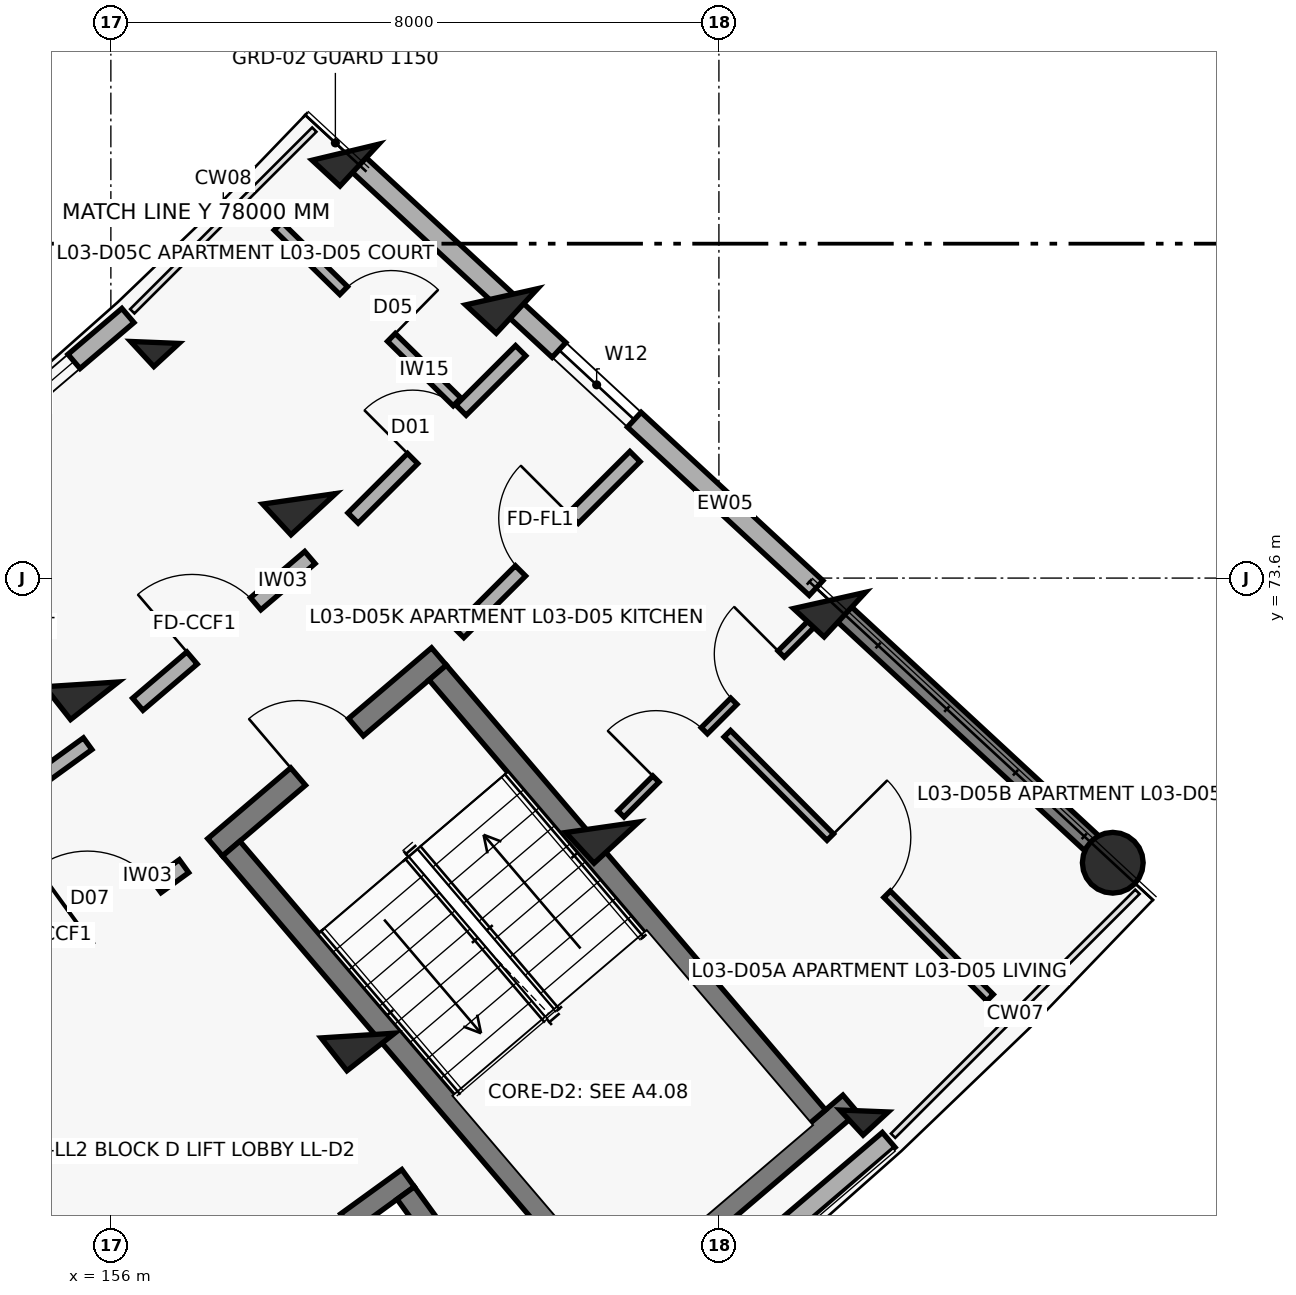
"""IFC4 building model, lengths in metres.
Left out: names, types, materials, properties, quantities, classifications, styles, units other than length and angle.
Written with IfcOpenShell. Run it as: python <this file> out.ifc"""

import sys

from ifc_helpers import new_model, si_unit, direction, frame, frame_2d, origin, origin_2d, place, context, subcontext, project, spatial, rectangle, circle, extrude, element, fill, save


model = new_model("IFC4")
c1 = context("Model", 3, precision=1e-05, world=origin(), true_north=direction((0.0, 1.0)))
c2 = subcontext(c1, "Body", "Model", "MODEL_VIEW")
j1 = project(units=[si_unit("LENGTHUNIT", "METRE"), si_unit("PLANEANGLEUNIT", "RADIAN")], contexts=[c1])
p1 = place(None, origin())
s1 = spatial("IfcSite", under=j1, at=p1, CompositionType="ELEMENT")
p2 = place(p1, origin())
s2 = spatial("IfcBuilding", under=s1, at=p2, CompositionType="ELEMENT")
p3 = place(p2, frame((0.0, 0.0, 11.2)))
s3 = spatial("IfcBuildingStorey", under=s2, at=p3, CompositionType="ELEMENT", Elevation=11.2)
for number, where, z_axis, x_axis in (
    (1, (155.831, 65.101, 0.0), (0.0, 0.0, 1.0), (0.555, -0.832, 0.0)),
    (2, (155.614, 72.202, 0.0), (0.0, 0.0, 1.0), (0.618, -0.786, 0.0)),
    (3, (159.25, 67.581, 0.0), (0.0, 0.0, 1.0), (0.618, -0.786, 0.0)),
):
    element("IfcColumn", number, at=place(p3, frame(where, z_axis=z_axis, x_axis=x_axis)), inside=s3, PredefinedType="COLUMN", context=c2, shape_type="SweptSolid", body=[
        extrude(rectangle(XDim=0.55, YDim=0.8, at=origin_2d()), origin(), (0.0, 0.0, 1.0), 3.1),
    ])
p4 = place(p3, frame((156.579, 76.701, 0.0), z_axis=(0.0, 0.0, 1.0), x_axis=(0.678159669868, -0.73491459515, 0.0)))
e4 = element("IfcColumn", 4, at=p4, inside=s3, PredefinedType="COLUMN", context=c2, shape_type="SweptSolid", body=[
    extrude(rectangle(XDim=0.45, YDim=0.45, at=origin_2d()), origin(), (0.0, 0.0, 1.0), 3.1),
])
for number, where, z_axis, x_axis in (
    (5, (158.477, 74.643, 0.0), (0.0, 0.0, 1.0), (0.678, -0.735, 0.0)),
    (6, (162.465, 70.322, 0.0), (0.0, 0.0, 1.0), (0.678, -0.735, 0.0)),
):
    element("IfcColumn", number, at=place(p3, frame(where, z_axis=z_axis, x_axis=x_axis)), inside=s3, PredefinedType="COLUMN", context=c2, shape_type="SweptSolid", body=[
        extrude(rectangle(XDim=0.55, YDim=0.8, at=origin_2d()), origin(), (0.0, 0.0, 1.0), 3.1),
    ])
p5 = place(p3, frame((165.91, 66.588, 0.0), z_axis=(0.0, 0.0, 1.0), x_axis=(0.678159669868, -0.73491459515, 0.0)))
e7 = element("IfcColumn", 7, at=p5, inside=s3, PredefinedType="COLUMN", context=c2, shape_type="SweptSolid", body=[
    extrude(rectangle(XDim=0.45, YDim=0.45, at=origin_2d()), origin(), (0.0, 0.0, 1.0), 3.1),
])
p6 = place(p3, frame((159.086, 79.204, 0.0), z_axis=(0.0, 0.0, 1.0), x_axis=(0.733729864503, -0.679441304262, 0.0)))
e8 = element("IfcColumn", 8, at=p6, inside=s3, PredefinedType="COLUMN", context=c2, shape_type="SweptSolid", body=[
    extrude(rectangle(XDim=0.5, YDim=0.75, at=origin_2d()), origin(), (0.0, 0.0, 1.0), 3.1),
])
for number, where, z_axis, x_axis in (
    (9, (161.14, 77.301, 0.0), (0.0, 0.0, 1.0), (0.734, -0.679, 0.0)),
    (10, (165.455, 73.306, 0.0), (0.0, 0.0, 1.0), (0.734, -0.679, 0.0)),
):
    element("IfcColumn", number, at=place(p3, frame(where, z_axis=z_axis, x_axis=x_axis)), inside=s3, PredefinedType="COLUMN", context=c2, shape_type="SweptSolid", body=[
        extrude(rectangle(XDim=0.55, YDim=0.8, at=origin_2d()), origin(), (0.0, 0.0, 1.0), 3.1),
    ])
p7 = place(p3, frame((169.182, 69.854, 0.0), z_axis=(0.0, 0.0, 1.0), x_axis=(0.733729864503, -0.679441304262, 0.0)))
e11 = element("IfcColumn", 11, at=p7, inside=s3, PredefinedType="COLUMN", context=c2, shape_type="SweptSolid", body=[
    extrude(circle(Radius=0.4, at=origin_2d()), origin(), (0.0, 0.0, 1.0), 3.1),
])
p8 = place(p3, frame((165.587, 73.184, 0.0), z_axis=(0.0, 0.0, 1.0), x_axis=(0.733739663667, -0.679430721974, 0.0)))
e12 = element("IfcWall", 12, at=p8, inside=s3, PredefinedType="SHEAR", context=c2, shape_type="SweptSolid", body=[
    extrude(rectangle(XDim=4.72, YDim=0.27, at=frame_2d((2.36, 0.0))), origin(), (0.0, 0.0, 1.0), 2.86),
])
p9 = place(p3, frame((162.716, 63.209, 0.0), z_axis=(0.0, 0.0, 1.0), x_axis=(0.760968923704, 0.64878833001, 0.0)))
e13 = element("IfcWall", 13, at=p9, inside=s3, PredefinedType="SOLIDWALL", context=c2, shape_type="SweptSolid", body=[
    extrude(rectangle(XDim=4.623, YDim=0.258, at=frame_2d((2.311, 0.0))), origin(), (0.0, 0.0, 1.0), 2.25),
])
p10 = place(p3, frame((153.589, 74.808, 0.0), z_axis=(0.0, 0.0, 1.0), x_axis=(0.760985425115, 0.648768974876, 0.0)))
e14 = element("IfcWall", 14, at=p10, inside=s3, PredefinedType="SOLIDWALL", context=c2, shape_type="SweptSolid", body=[
    extrude(rectangle(XDim=3.464, YDim=0.245, at=frame_2d((1.732, 0.0))), origin(), (0.0, 0.0, 1.0), 2.25),
])
p11 = place(p10, frame((0.932, 0.0, 0.32)))
e15 = element("IfcOpeningElement", 15, at=p11, cuts=e14, PredefinedType="OPENING", context=c2, shape_type="SweptSolid", body=[
    extrude(rectangle(XDim=1.6, YDim=1.5, at=frame_2d((0.8, 0.75))), frame((0.0, 0.133, 0.0), z_axis=(0.0, -1.0, 0.0), x_axis=(1.0, 0.0, 0.0)), (0.0, 0.0, 1.0), 0.265),
])
p12 = place(p3, frame((159.262, 79.041, 0.0), z_axis=(0.0, 0.0, 1.0), x_axis=(0.733738684326, -0.679431779595, 0.0)))
e16 = element("IfcWall", 16, at=p12, inside=s3, PredefinedType="SOLIDWALL", context=c2, shape_type="SweptSolid", body=[
    extrude(rectangle(XDim=8.2, YDim=0.265, at=frame_2d((4.1, 0.0))), origin(), (0.0, 0.0, 1.0), 2.08),
])
p13 = place(p12, frame((3.59, 0.0, 0.75)))
e17 = element("IfcOpeningElement", 17, at=p13, cuts=e16, PredefinedType="OPENING", context=c2, shape_type="SweptSolid", body=[
    extrude(rectangle(XDim=1.35, YDim=1.35, at=frame_2d((0.675, 0.675))), frame((0.0, 0.142, 0.0), z_axis=(0.0, -1.0, 0.0), x_axis=(1.0, 0.0, 0.0)), (0.0, 0.0, 1.0), 0.285),
])
p14 = place(p3, frame((157.372, 70.058, 0.0), z_axis=(0.0, 0.0, 1.0), x_axis=(0.760990583254, 0.648762924495, 0.0)))
e18 = element("IfcWall", 18, at=p14, inside=s3, PredefinedType="SHEAR", context=c2, shape_type="SweptSolid", body=[
    extrude(rectangle(XDim=3.87, YDim=0.3, at=frame_2d((1.935, 0.0))), origin(), (0.0, 0.0, 1.0), 3.1),
])
p15 = place(p14, frame((1.435, 0.0, 0.0)))
e19 = element("IfcOpeningElement", 19, at=p15, cuts=e18, PredefinedType="OPENING", context=c2, shape_type="SweptSolid", body=[
    extrude(rectangle(XDim=1.0, YDim=2.15, at=frame_2d((0.5, 1.075))), frame((0.0, 0.16, 0.0), z_axis=(0.0, -1.0, 0.0), x_axis=(1.0, 0.0, 0.0)), (0.0, 0.0, 1.0), 0.32),
])
p16 = place(p3, frame((162.327, 63.783, 0.0), z_axis=(0.0, 0.0, 1.0), x_axis=(0.760969560012, 0.648787583678, 0.0)))
e20 = element("IfcWall", 20, at=p16, inside=s3, PredefinedType="SHEAR", context=c2, shape_type="SweptSolid", body=[
    extrude(rectangle(XDim=4.47, YDim=0.3, at=frame_2d((2.235, 0.0))), origin(), (0.0, 0.0, 1.0), 3.1),
])
p17 = place(p3, frame((157.583, 70.041, 0.0), z_axis=(0.0, 0.0, 1.0), x_axis=(0.648762810187, -0.760990680704, 0.0)))
e21 = element("IfcWall", 21, at=p17, inside=s3, PredefinedType="SHEAR", context=c2, shape_type="SweptSolid", body=[
    extrude(rectangle(XDim=7.69, YDim=0.3, at=frame_2d((3.845, 0.0))), origin(), (0.0, 0.0, 1.0), 3.1),
])
p18 = place(p3, frame((160.3, 72.357, 0.0), z_axis=(0.0, 0.0, 1.0), x_axis=(0.648781194888, -0.760975006922, 0.0)))
e22 = element("IfcWall", 22, at=p18, inside=s3, PredefinedType="SHEAR", context=c2, shape_type="SweptSolid", body=[
    extrude(rectangle(XDim=7.69, YDim=0.3, at=frame_2d((3.845, 0.0))), origin(), (0.0, 0.0, 1.0), 3.1),
])
p19 = place(p3, frame((157.409, 63.89, 0.0), z_axis=(0.0, 0.0, 1.0), x_axis=(0.809510936031, 0.587104798521, 0.0)))
e23 = element("IfcWall", 23, at=p19, inside=s3, PredefinedType="SHEAR", context=c2, shape_type="SweptSolid", body=[
    extrude(rectangle(XDim=3.09, YDim=0.28, at=frame_2d((1.545, 0.0))), origin(), (0.0, 0.0, 1.0), 3.1),
])
p20 = place(p19, frame((0.995, 0.0, 0.0)))
e24 = element("IfcOpeningElement", 24, at=p20, cuts=e23, PredefinedType="OPENING", context=c2, shape_type="SweptSolid", body=[
    extrude(rectangle(XDim=1.1, YDim=2.15, at=frame_2d((0.55, 1.075))), frame((0.0, 0.15, 0.0), z_axis=(0.0, -1.0, 0.0), x_axis=(1.0, 0.0, 0.0)), (0.0, 0.0, 1.0), 0.3),
])
p21 = place(p3, frame((159.879, 65.509, 0.0), z_axis=(0.0, 0.0, 1.0), x_axis=(0.58704837408, -0.809551855344, 0.0)))
e25 = element("IfcWall", 25, at=p21, inside=s3, PredefinedType="SHEAR", context=c2, shape_type="SweptSolid", body=[
    extrude(rectangle(XDim=2.03, YDim=0.28, at=frame_2d((1.015, 0.0))), origin(), (0.0, 0.0, 1.0), 3.1),
])
p22 = place(p3, frame((152.448, 66.442, 0.0), z_axis=(0.0, 0.0, 1.0), x_axis=(0.520511872578, -0.853854431683, 0.0)))
e26 = element("IfcWall", 26, at=p22, inside=s3, PredefinedType="PARTITIONING", context=c2, shape_type="SweptSolid", body=[
    extrude(rectangle(XDim=7.95, YDim=0.14, at=frame_2d((3.975, 0.0))), origin(), (0.0, 0.0, 1.0), 2.08),
])
p23 = place(p22, frame((6.05, 0.0, 0.0)))
e27 = element("IfcOpeningElement", 27, at=p23, cuts=e26, PredefinedType="OPENING", context=c2, shape_type="SweptSolid", body=[
    extrude(rectangle(XDim=0.92, YDim=2.1, at=frame_2d((0.46, 1.05))), frame((0.0, 0.08, 0.0), z_axis=(0.0, -1.0, 0.0), x_axis=(1.0, 0.0, 0.0)), (0.0, 0.0, 1.0), 0.16),
])
p24 = place(p3, frame((154.423, 67.968, 0.0), z_axis=(0.0, 0.0, 1.0), x_axis=(0.809516127005, 0.587097641043, 0.0)))
e28 = element("IfcWall", 28, at=p24, inside=s3, PredefinedType="SOLIDWALL", context=c2, shape_type="SweptSolid", body=[
    extrude(rectangle(XDim=3.137, YDim=0.21, at=frame_2d((1.569, 0.0))), origin(), (0.0, 0.0, 1.0), 2.08),
])
p25 = place(p24, frame((0.45, 0.0, 0.0)))
e29 = element("IfcOpeningElement", 29, at=p25, cuts=e28, PredefinedType="OPENING", context=c2, shape_type="SweptSolid", body=[
    extrude(rectangle(XDim=1.1, YDim=2.15, at=frame_2d((0.55, 1.075))), frame((0.0, 0.115, 0.0), z_axis=(0.0, -1.0, 0.0), x_axis=(1.0, 0.0, 0.0)), (0.0, 0.0, 1.0), 0.23),
])
p26 = place(p24, frame((1.567, 0.0, 0.0)))
e30 = element("IfcOpeningElement", 30, at=p26, cuts=e28, PredefinedType="OPENING", context=c2, shape_type="SweptSolid", body=[
    extrude(rectangle(XDim=1.12, YDim=2.15, at=frame_2d((0.56, 1.075))), frame((0.0, 0.115, 0.0), z_axis=(0.0, -1.0, 0.0), x_axis=(1.0, 0.0, 0.0)), (0.0, 0.0, 1.0), 0.23),
])
p27 = place(p3, frame((153.285, 69.674, 0.0), z_axis=(0.0, 0.0, 1.0), x_axis=(0.809505174959, 0.587112741911, 0.0)))
e31 = element("IfcWall", 31, at=p27, inside=s3, PredefinedType="SOLIDWALL", context=c2, shape_type="SweptSolid", body=[
    extrude(rectangle(XDim=2.976, YDim=0.19, at=frame_2d((1.488, 0.0))), origin(), (0.0, 0.0, 1.0), 2.08),
])
p28 = place(p27, frame((0.928, 0.0, 0.0)))
e32 = element("IfcOpeningElement", 32, at=p28, cuts=e31, PredefinedType="OPENING", context=c2, shape_type="SweptSolid", body=[
    extrude(rectangle(XDim=1.12, YDim=2.15, at=frame_2d((0.56, 1.075))), frame((0.0, 0.105, 0.0), z_axis=(0.0, -1.0, 0.0), x_axis=(1.0, 0.0, 0.0)), (0.0, 0.0, 1.0), 0.21),
])
p29 = place(p3, frame((156.354, 71.94, 0.0), z_axis=(0.0, 0.0, 1.0), x_axis=(0.760991187621, 0.648762215579, 0.0)))
e33 = element("IfcWall", 33, at=p29, inside=s3, PredefinedType="SOLIDWALL", context=c2, shape_type="SweptSolid", body=[
    extrude(rectangle(XDim=2.976, YDim=0.21, at=frame_2d((1.488, 0.0))), origin(), (0.0, 0.0, 1.0), 2.08),
])
p30 = place(p29, frame((0.938, 0.0, 0.0)))
e34 = element("IfcOpeningElement", 34, at=p30, cuts=e33, PredefinedType="OPENING", context=c2, shape_type="SweptSolid", body=[
    extrude(rectangle(XDim=1.1, YDim=2.15, at=frame_2d((0.55, 1.075))), frame((0.0, 0.115, 0.0), z_axis=(0.0, -1.0, 0.0), x_axis=(1.0, 0.0, 0.0)), (0.0, 0.0, 1.0), 0.23),
])
p31 = place(p3, frame((160.576, 72.884, 0.0), z_axis=(0.0, 0.0, 1.0), x_axis=(0.70773973846, 0.706473256822, 0.0)))
e35 = element("IfcWall", 35, at=p31, inside=s3, PredefinedType="SOLIDWALL", context=c2, shape_type="SweptSolid", body=[
    extrude(rectangle(XDim=3.277, YDim=0.19, at=frame_2d((1.639, 0.0))), origin(), (0.0, 0.0, 1.0), 2.08),
])
p32 = place(p31, frame((1.148, 0.0, 0.0)))
e36 = element("IfcOpeningElement", 36, at=p32, cuts=e35, PredefinedType="OPENING", context=c2, shape_type="SweptSolid", body=[
    extrude(rectangle(XDim=0.98, YDim=2.15, at=frame_2d((0.49, 1.075))), frame((0.0, 0.105, 0.0), z_axis=(0.0, -1.0, 0.0), x_axis=(1.0, 0.0, 0.0)), (0.0, 0.0, 1.0), 0.21),
])
p33 = place(p3, frame((159.186, 74.39, 0.0), z_axis=(0.0, 0.0, 1.0), x_axis=(0.70773330139, 0.706479705373, 0.0)))
e37 = element("IfcWall", 37, at=p33, inside=s3, PredefinedType="SOLIDWALL", context=c2, shape_type="SweptSolid", body=[
    extrude(rectangle(XDim=3.116, YDim=0.19, at=frame_2d((1.558, 0.0))), origin(), (0.0, 0.0, 1.0), 2.08),
])
p34 = place(p33, frame((1.108, 0.0, 0.0)))
e38 = element("IfcOpeningElement", 38, at=p34, cuts=e37, PredefinedType="OPENING", context=c2, shape_type="SweptSolid", body=[
    extrude(rectangle(XDim=0.9, YDim=2.1, at=frame_2d((0.45, 1.05))), frame((0.0, 0.105, 0.0), z_axis=(0.0, -1.0, 0.0), x_axis=(1.0, 0.0, 0.0)), (0.0, 0.0, 1.0), 0.21),
])
p35 = place(p3, frame((158.2, 78.23, 0.0), z_axis=(0.0, 0.0, 1.0), x_axis=(0.713587506757, -0.700566106945, 0.0)))
e39 = element("IfcWall", 39, at=p35, inside=s3, PredefinedType="PARTITIONING", context=c2, shape_type="SweptSolid", body=[
    extrude(rectangle(XDim=3.3, YDim=0.145, at=frame_2d((1.65, 0.0))), origin(), (0.0, 0.0, 1.0), 2.08),
])
p36 = place(p35, frame((1.21, 0.0, 0.0)))
e40 = element("IfcOpeningElement", 40, at=p36, cuts=e39, PredefinedType="OPENING", context=c2, shape_type="SweptSolid", body=[
    extrude(rectangle(XDim=0.88, YDim=2.1, at=frame_2d((0.44, 1.05))), frame((0.0, 0.083, 0.0), z_axis=(0.0, -1.0, 0.0), x_axis=(1.0, 0.0, 0.0)), (0.0, 0.0, 1.0), 0.165),
])
p37 = place(p3, frame((162.711, 70.497, 0.0), z_axis=(0.0, 0.0, 1.0), x_axis=(0.70774573777, 0.706467246706, 0.0)))
e41 = element("IfcWall", 41, at=p37, inside=s3, PredefinedType="PARTITIONING", context=c2, shape_type="SweptSolid", body=[
    extrude(rectangle(XDim=3.628, YDim=0.115, at=frame_2d((1.814, 0.0))), origin(), (0.0, 0.0, 1.0), 2.08),
])
p38 = place(p37, frame((0.65, 0.0, 0.0)))
e42 = element("IfcOpeningElement", 42, at=p38, cuts=e41, PredefinedType="OPENING", context=c2, shape_type="SweptSolid", body=[
    extrude(rectangle(XDim=0.9, YDim=2.1, at=frame_2d((0.45, 1.05))), frame((0.0, 0.067, 0.0), z_axis=(0.0, -1.0, 0.0), x_axis=(1.0, 0.0, 0.0)), (0.0, 0.0, 1.0), 0.135),
])
p39 = place(p37, frame((2.098, 0.0, 0.0)))
e43 = element("IfcOpeningElement", 43, at=p39, cuts=e41, PredefinedType="OPENING", context=c2, shape_type="SweptSolid", body=[
    extrude(rectangle(XDim=0.88, YDim=2.1, at=frame_2d((0.44, 1.05))), frame((0.0, 0.067, 0.0), z_axis=(0.0, -1.0, 0.0), x_axis=(1.0, 0.0, 0.0)), (0.0, 0.0, 1.0), 0.135),
])
p40 = place(p3, frame((164.11, 71.552, 0.0), z_axis=(0.0, 0.0, 1.0), x_axis=(0.705460671411, -0.708749067789, 0.0)))
e44 = element("IfcWall", 44, at=p40, inside=s3, PredefinedType="PARTITIONING", context=c2, shape_type="SweptSolid", body=[
    extrude(rectangle(XDim=4.9, YDim=0.12, at=frame_2d((2.45, 0.0))), origin(), (0.0, 0.0, 1.0), 2.08),
])
p41 = place(p40, frame((1.92, 0.0, 0.0)))
e45 = element("IfcOpeningElement", 45, at=p41, cuts=e44, PredefinedType="OPENING", context=c2, shape_type="SweptSolid", body=[
    extrude(rectangle(XDim=1.06, YDim=2.1, at=frame_2d((0.53, 1.05))), frame((0.0, 0.07, 0.0), z_axis=(0.0, -1.0, 0.0), x_axis=(1.0, 0.0, 0.0)), (0.0, 0.0, 1.0), 0.14),
])
p42 = place(p11, origin())
e46 = element("IfcWindow", 46, at=p42, inside=s3, PartitioningType="DOUBLE_PANEL_VERTICAL", PredefinedType="WINDOW", context=c2, shape_type="SweptSolid", body=[
    extrude(rectangle(XDim=1.6, YDim=1.5, at=frame_2d((0.8, 0.75))), frame((0.0, 0.03, 0.0), z_axis=(0.0, -1.0, 0.0), x_axis=(1.0, 0.0, 0.0)), (0.0, 0.0, 1.0), 0.06),
])
fill(e15, e46)
p43 = place(p13, origin())
e47 = element("IfcWindow", 47, at=p43, inside=s3, PartitioningType="DOUBLE_PANEL_VERTICAL", PredefinedType="WINDOW", context=c2, shape_type="SweptSolid", body=[
    extrude(rectangle(XDim=1.35, YDim=1.35, at=frame_2d((0.675, 0.675))), frame((0.0, 0.03, 0.0), z_axis=(0.0, -1.0, 0.0), x_axis=(1.0, 0.0, 0.0)), (0.0, 0.0, 1.0), 0.06),
])
fill(e17, e47)
p44 = place(p15, origin())
e48 = element("IfcDoor", 48, at=p44, inside=s3, OperationType="SINGLE_SWING_LEFT", PredefinedType="DOOR", context=c2, shape_type="SweptSolid", body=[
    extrude(rectangle(XDim=1.0, YDim=2.15, at=frame_2d((0.5, 1.075))), frame((0.0, 0.025, 0.0), z_axis=(0.0, -1.0, 0.0), x_axis=(1.0, 0.0, 0.0)), (0.0, 0.0, 1.0), 0.05),
])
fill(e19, e48)
p45 = place(p25, origin())
e49 = element("IfcDoor", 49, at=p45, inside=s3, OperationType="SINGLE_SWING_RIGHT", PredefinedType="DOOR", context=c2, shape_type="SweptSolid", body=[
    extrude(rectangle(XDim=1.1, YDim=2.15, at=frame_2d((0.55, 1.075))), frame((0.0, 0.025, 0.0), z_axis=(0.0, -1.0, 0.0), x_axis=(1.0, 0.0, 0.0)), (0.0, 0.0, 1.0), 0.05),
])
fill(e29, e49)
p46 = place(p26, origin())
e50 = element("IfcDoor", 50, at=p46, inside=s3, OperationType="SINGLE_SWING_LEFT", PredefinedType="DOOR", context=c2, shape_type="SweptSolid", body=[
    extrude(rectangle(XDim=1.12, YDim=2.15, at=frame_2d((0.56, 1.075))), frame((0.0, 0.025, 0.0), z_axis=(0.0, -1.0, 0.0), x_axis=(1.0, 0.0, 0.0)), (0.0, 0.0, 1.0), 0.05),
])
fill(e30, e50)
p47 = place(p30, origin())
e51 = element("IfcDoor", 51, at=p47, inside=s3, OperationType="SINGLE_SWING_LEFT", PredefinedType="DOOR", context=c2, shape_type="SweptSolid", body=[
    extrude(rectangle(XDim=1.1, YDim=2.15, at=frame_2d((0.55, 1.075))), frame((0.0, 0.025, 0.0), z_axis=(0.0, -1.0, 0.0), x_axis=(1.0, 0.0, 0.0)), (0.0, 0.0, 1.0), 0.05),
])
fill(e34, e51)
p48 = place(p32, origin())
e52 = element("IfcDoor", 52, at=p48, inside=s3, OperationType="SINGLE_SWING_RIGHT", PredefinedType="DOOR", context=c2, shape_type="SweptSolid", body=[
    extrude(rectangle(XDim=0.98, YDim=2.15, at=frame_2d((0.49, 1.075))), frame((0.0, 0.025, 0.0), z_axis=(0.0, -1.0, 0.0), x_axis=(1.0, 0.0, 0.0)), (0.0, 0.0, 1.0), 0.05),
])
fill(e36, e52)
p49 = place(p34, origin())
e53 = element("IfcDoor", 53, at=p49, inside=s3, OperationType="SINGLE_SWING_LEFT", PredefinedType="DOOR", context=c2, shape_type="SweptSolid", body=[
    extrude(rectangle(XDim=0.9, YDim=2.1, at=frame_2d((0.45, 1.05))), frame((0.0, 0.025, 0.0), z_axis=(0.0, -1.0, 0.0), x_axis=(1.0, 0.0, 0.0)), (0.0, 0.0, 1.0), 0.05),
])
fill(e38, e53)
p50 = place(p36, origin())
e54 = element("IfcDoor", 54, at=p50, inside=s3, OperationType="SINGLE_SWING_RIGHT", PredefinedType="DOOR", context=c2, shape_type="SweptSolid", body=[
    extrude(rectangle(XDim=0.88, YDim=2.1, at=frame_2d((0.44, 1.05))), frame((0.0, 0.025, 0.0), z_axis=(0.0, -1.0, 0.0), x_axis=(1.0, 0.0, 0.0)), (0.0, 0.0, 1.0), 0.05),
])
fill(e40, e54)
p51 = place(p38, origin())
e55 = element("IfcDoor", 55, at=p51, inside=s3, OperationType="SINGLE_SWING_LEFT", PredefinedType="DOOR", context=c2, shape_type="SweptSolid", body=[
    extrude(rectangle(XDim=0.9, YDim=2.1, at=frame_2d((0.45, 1.05))), frame((0.0, 0.025, 0.0), z_axis=(0.0, -1.0, 0.0), x_axis=(1.0, 0.0, 0.0)), (0.0, 0.0, 1.0), 0.05),
])
fill(e42, e55)
p52 = place(p39, origin())
e56 = element("IfcDoor", 56, at=p52, inside=s3, OperationType="SINGLE_SWING_RIGHT", PredefinedType="DOOR", context=c2, shape_type="SweptSolid", body=[
    extrude(rectangle(XDim=0.88, YDim=2.1, at=frame_2d((0.44, 1.05))), frame((0.0, 0.025, 0.0), z_axis=(0.0, -1.0, 0.0), x_axis=(1.0, 0.0, 0.0)), (0.0, 0.0, 1.0), 0.05),
])
fill(e43, e56)
p53 = place(p41, origin())
e57 = element("IfcDoor", 57, at=p53, inside=s3, OperationType="SINGLE_SWING_LEFT", PredefinedType="DOOR", context=c2, shape_type="SweptSolid", body=[
    extrude(rectangle(XDim=1.06, YDim=2.1, at=frame_2d((0.53, 1.05))), frame((0.0, 0.025, 0.0), z_axis=(0.0, -1.0, 0.0), x_axis=(1.0, 0.0, 0.0)), (0.0, 0.0, 1.0), 0.05),
])
fill(e45, e57)
save(model, sys.argv[1])
